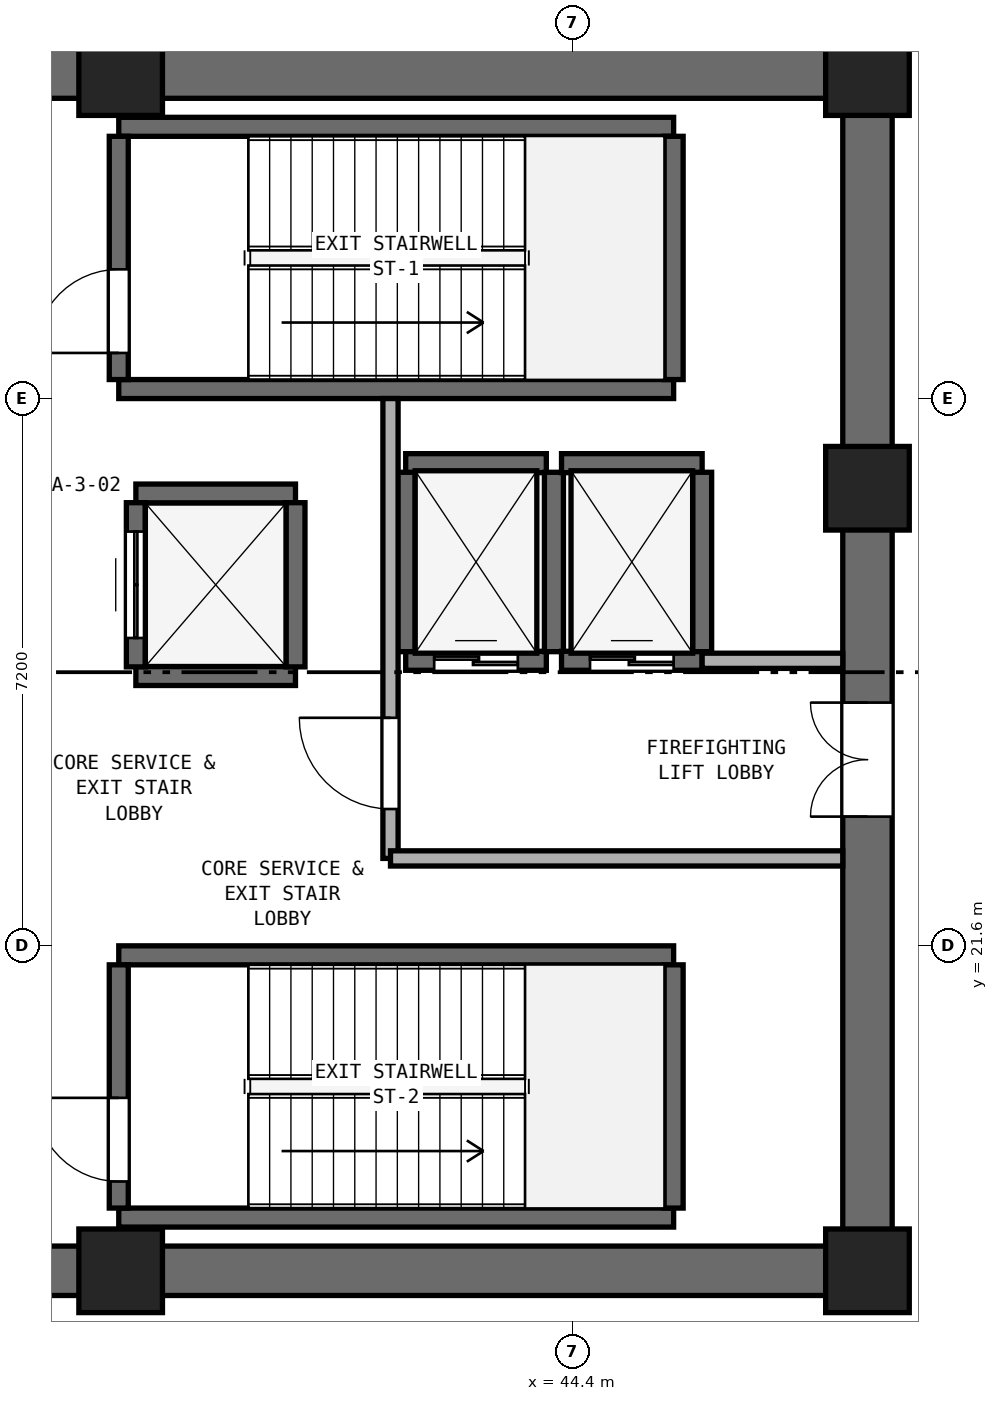
"""IFC4 building model, lengths in metres.
Left out: names, types, materials, properties, quantities, classifications, styles, units other than length and angle.
Written with IfcOpenShell. Run it as: python <this file> out.ifc"""

import sys

from ifc_helpers import new_model, si_unit, direction, frame, frame_2d, origin, origin_2d, place, context, subcontext, project, spatial, rectangle, extrude, element, fill, save


model = new_model("IFC4")
c1 = context("Model", 3, precision=1e-05, world=origin(), true_north=direction((0.0, 1.0)))
c2 = subcontext(c1, "Body", "Model", "MODEL_VIEW")
j1 = project(units=[si_unit("LENGTHUNIT", "METRE"), si_unit("PLANEANGLEUNIT", "RADIAN")], contexts=[c1])
p1 = place(None, origin())
s1 = spatial("IfcSite", under=j1, at=p1, CompositionType="ELEMENT")
p2 = place(p1, origin())
s2 = spatial("IfcBuilding", under=s1, at=p2, CompositionType="ELEMENT")
p3 = place(p2, frame((0.0, 0.0, 5.0)))
s3 = spatial("IfcBuildingStorey", under=s2, at=p3, CompositionType="ELEMENT", Elevation=5.0)
for number, where, z_axis, x_axis in (
    (1, (25.4, 17.325, 0.0), (0.0, 0.0, 1.0), (1.0, 0.0, 0.0)),
    (2, (25.4, 33.075, 0.0), (0.0, 0.0, 1.0), (1.0, 0.0, 0.0)),
):
    element("IfcWall", number, at=place(p3, frame(where, z_axis=z_axis, x_axis=x_axis)), inside=s3, PredefinedType="SHEAR", context=c2, shape_type="SweptSolid", body=[
        extrude(rectangle(XDim=23.2, YDim=0.65, at=frame_2d((11.6, 0.0))), origin(), (0.0, 0.0, 1.0), 4.66),
    ])
p4 = place(p3, frame((48.275, 17.65, 0.0), z_axis=(0.0, 0.0, 1.0), x_axis=(0.0, 1.0, 0.0)))
e3 = element("IfcWall", 3, at=p4, inside=s3, PredefinedType="SHEAR", context=c2, shape_type="SweptSolid", body=[
    extrude(rectangle(XDim=15.1, YDim=0.65, at=frame_2d((7.55, 0.0))), origin(), (0.0, 0.0, 1.0), 4.66),
])
p5 = place(p4, frame((5.65, 0.0, 0.0)))
e4 = element("IfcOpeningElement", 4, at=p5, cuts=e3, PredefinedType="OPENING", context=c2, shape_type="SweptSolid", body=[
    extrude(rectangle(XDim=1.5, YDim=2.15, at=frame_2d((0.75, 1.075))), frame((0.0, 0.335, 0.0), z_axis=(0.0, -1.0, 0.0), x_axis=(1.0, 0.0, 0.0)), (0.0, 0.0, 1.0), 0.67),
])
for number, where, z_axis, x_axis in (
    (5, (38.45, 17.325, 0.0), (0.0, 0.0, 1.0), (1.0, 0.0, 0.0)),
    (6, (48.275, 17.325, 0.0), (0.0, 0.0, 1.0), (1.0, 0.0, 0.0)),
    (7, (48.275, 27.62, 0.0), (0.0, 0.0, 1.0), (1.0, 0.0, 0.0)),
    (8, (48.275, 33.075, 0.0), (0.0, 0.0, 1.0), (1.0, 0.0, 0.0)),
    (9, (38.45, 33.075, 0.0), (0.0, 0.0, 1.0), (1.0, 0.0, 0.0)),
):
    element("IfcColumn", number, at=place(p3, frame(where, z_axis=z_axis, x_axis=x_axis)), inside=s3, PredefinedType="PILASTER", context=c2, shape_type="SweptSolid", body=[
        extrude(rectangle(XDim=1.1, YDim=1.1, at=origin_2d()), origin(), (0.0, 0.0, 1.0), 5.0),
    ])
for number, where, z_axis, x_axis in (
    (10, (38.425, 28.925, 0.0), (0.0, 0.0, 1.0), (1.0, 0.0, 0.0)),
    (11, (38.425, 32.375, 0.0), (0.0, 0.0, 1.0), (1.0, 0.0, 0.0)),
):
    element("IfcWall", number, at=place(p3, frame(where, z_axis=z_axis, x_axis=x_axis)), inside=s3, PredefinedType="SHEAR", context=c2, shape_type="SweptSolid", body=[
        extrude(rectangle(XDim=7.3, YDim=0.25, at=frame_2d((3.65, 0.0))), origin(), (0.0, 0.0, 1.0), 4.66),
    ])
p6 = place(p3, frame((38.425, 29.05, 0.0), z_axis=(0.0, 0.0, 1.0), x_axis=(0.0, 1.0, 0.0)))
e12 = element("IfcWall", 12, at=p6, inside=s3, PredefinedType="SHEAR", context=c2, shape_type="SweptSolid", body=[
    extrude(rectangle(XDim=3.2, YDim=0.25, at=frame_2d((1.6, 0.0))), origin(), (0.0, 0.0, 1.0), 4.66),
])
p7 = place(p6, frame((0.35, 0.0, 0.0)))
e13 = element("IfcOpeningElement", 13, at=p7, cuts=e12, PredefinedType="OPENING", context=c2, shape_type="SweptSolid", body=[
    extrude(rectangle(XDim=1.1, YDim=2.15, at=frame_2d((0.55, 1.075))), frame((0.0, 0.135, 0.0), z_axis=(0.0, -1.0, 0.0), x_axis=(1.0, 0.0, 0.0)), (0.0, 0.0, 1.0), 0.27),
])
p8 = place(p3, frame((45.725, 29.05, 0.0), z_axis=(0.0, 0.0, 1.0), x_axis=(0.0, 1.0, 0.0)))
e14 = element("IfcWall", 14, at=p8, inside=s3, PredefinedType="SHEAR", context=c2, shape_type="SweptSolid", body=[
    extrude(rectangle(XDim=3.2, YDim=0.25, at=frame_2d((1.6, 0.0))), origin(), (0.0, 0.0, 1.0), 4.66),
])
for number, where, z_axis, x_axis in (
    (15, (38.425, 18.025, 0.0), (0.0, 0.0, 1.0), (1.0, 0.0, 0.0)),
    (16, (38.425, 21.475, 0.0), (0.0, 0.0, 1.0), (1.0, 0.0, 0.0)),
):
    element("IfcWall", number, at=place(p3, frame(where, z_axis=z_axis, x_axis=x_axis)), inside=s3, PredefinedType="SHEAR", context=c2, shape_type="SweptSolid", body=[
        extrude(rectangle(XDim=7.3, YDim=0.25, at=frame_2d((3.65, 0.0))), origin(), (0.0, 0.0, 1.0), 4.66),
    ])
p9 = place(p3, frame((38.425, 18.15, 0.0), z_axis=(0.0, 0.0, 1.0), x_axis=(0.0, 1.0, 0.0)))
e17 = element("IfcWall", 17, at=p9, inside=s3, PredefinedType="SHEAR", context=c2, shape_type="SweptSolid", body=[
    extrude(rectangle(XDim=3.2, YDim=0.25, at=frame_2d((1.6, 0.0))), origin(), (0.0, 0.0, 1.0), 4.66),
])
p10 = place(p9, frame((0.35, 0.0, 0.0)))
e18 = element("IfcOpeningElement", 18, at=p10, cuts=e17, PredefinedType="OPENING", context=c2, shape_type="SweptSolid", body=[
    extrude(rectangle(XDim=1.1, YDim=2.15, at=frame_2d((0.55, 1.075))), frame((0.0, 0.135, 0.0), z_axis=(0.0, -1.0, 0.0), x_axis=(1.0, 0.0, 0.0)), (0.0, 0.0, 1.0), 0.27),
])
p11 = place(p3, frame((45.725, 18.15, 0.0), z_axis=(0.0, 0.0, 1.0), x_axis=(0.0, 1.0, 0.0)))
e19 = element("IfcWall", 19, at=p11, inside=s3, PredefinedType="SHEAR", context=c2, shape_type="SweptSolid", body=[
    extrude(rectangle(XDim=3.2, YDim=0.25, at=frame_2d((1.6, 0.0))), origin(), (0.0, 0.0, 1.0), 4.66),
])
p12 = place(p3, frame((42.2, 25.35, 0.0), z_axis=(0.0, 0.0, 1.0), x_axis=(1.0, 0.0, 0.0)))
e20 = element("IfcWall", 20, at=p12, inside=s3, PredefinedType="SHEAR", context=c2, shape_type="SweptSolid", body=[
    extrude(rectangle(XDim=1.85, YDim=0.25, at=frame_2d((0.925, 0.0))), origin(), (0.0, 0.0, 1.0), 4.66),
])
p13 = place(p12, frame((0.375, 0.0, 0.0)))
e21 = element("IfcOpeningElement", 21, at=p13, cuts=e20, PredefinedType="OPENING", context=c2, shape_type="SweptSolid", body=[
    extrude(rectangle(XDim=1.1, YDim=2.15, at=frame_2d((0.55, 1.075))), frame((0.0, 0.135, 0.0), z_axis=(0.0, -1.0, 0.0), x_axis=(1.0, 0.0, 0.0)), (0.0, 0.0, 1.0), 0.27),
])
p14 = place(p3, frame((42.2, 27.95, 0.0), z_axis=(0.0, 0.0, 1.0), x_axis=(1.0, 0.0, 0.0)))
e22 = element("IfcWall", 22, at=p14, inside=s3, PredefinedType="SHEAR", context=c2, shape_type="SweptSolid", body=[
    extrude(rectangle(XDim=1.85, YDim=0.25, at=frame_2d((0.925, 0.0))), origin(), (0.0, 0.0, 1.0), 4.66),
])
for number, where, z_axis, x_axis in (
    (23, (42.2, 25.47, 0.0), (0.0, 0.0, 1.0), (0.0, 1.0, 0.0)),
    (24, (44.15, 25.47, 0.0), (0.0, 0.0, 1.0), (0.0, 1.0, 0.0)),
):
    element("IfcWall", number, at=place(p3, frame(where, z_axis=z_axis, x_axis=x_axis)), inside=s3, PredefinedType="SHEAR", context=c2, shape_type="SweptSolid", body=[
        extrude(rectangle(XDim=2.36, YDim=0.25, at=frame_2d((1.18, 0.0))), origin(), (0.0, 0.0, 1.0), 4.66),
    ])
p15 = place(p3, frame((44.25, 25.35, 0.0), z_axis=(0.0, 0.0, 1.0), x_axis=(1.0, 0.0, 0.0)))
e25 = element("IfcWall", 25, at=p15, inside=s3, PredefinedType="SHEAR", context=c2, shape_type="SweptSolid", body=[
    extrude(rectangle(XDim=1.85, YDim=0.25, at=frame_2d((0.925, 0.0))), origin(), (0.0, 0.0, 1.0), 4.66),
])
p16 = place(p15, frame((0.375, 0.0, 0.0)))
e26 = element("IfcOpeningElement", 26, at=p16, cuts=e25, PredefinedType="OPENING", context=c2, shape_type="SweptSolid", body=[
    extrude(rectangle(XDim=1.1, YDim=2.15, at=frame_2d((0.55, 1.075))), frame((0.0, 0.135, 0.0), z_axis=(0.0, -1.0, 0.0), x_axis=(1.0, 0.0, 0.0)), (0.0, 0.0, 1.0), 0.27),
])
p17 = place(p3, frame((44.25, 27.95, 0.0), z_axis=(0.0, 0.0, 1.0), x_axis=(1.0, 0.0, 0.0)))
e27 = element("IfcWall", 27, at=p17, inside=s3, PredefinedType="SHEAR", context=c2, shape_type="SweptSolid", body=[
    extrude(rectangle(XDim=1.85, YDim=0.25, at=frame_2d((0.925, 0.0))), origin(), (0.0, 0.0, 1.0), 4.66),
])
p18 = place(p3, frame((46.1, 25.47, 0.0), z_axis=(0.0, 0.0, 1.0), x_axis=(0.0, 1.0, 0.0)))
e28 = element("IfcWall", 28, at=p18, inside=s3, PredefinedType="SHEAR", context=c2, shape_type="SweptSolid", body=[
    extrude(rectangle(XDim=2.36, YDim=0.25, at=frame_2d((1.18, 0.0))), origin(), (0.0, 0.0, 1.0), 4.66),
])
for number, where, z_axis, x_axis in (
    (29, (38.65, 25.15, 0.0), (0.0, 0.0, 1.0), (1.0, 0.0, 0.0)),
    (30, (38.65, 27.55, 0.0), (0.0, 0.0, 1.0), (1.0, 0.0, 0.0)),
):
    element("IfcWall", number, at=place(p3, frame(where, z_axis=z_axis, x_axis=x_axis)), inside=s3, PredefinedType="SHEAR", context=c2, shape_type="SweptSolid", body=[
        extrude(rectangle(XDim=2.1, YDim=0.25, at=frame_2d((1.05, 0.0))), origin(), (0.0, 0.0, 1.0), 4.66),
    ])
p19 = place(p3, frame((38.65, 25.27, 0.0), z_axis=(0.0, 0.0, 1.0), x_axis=(0.0, 1.0, 0.0)))
e31 = element("IfcWall", 31, at=p19, inside=s3, PredefinedType="SHEAR", context=c2, shape_type="SweptSolid", body=[
    extrude(rectangle(XDim=2.16, YDim=0.25, at=frame_2d((1.08, 0.0))), origin(), (0.0, 0.0, 1.0), 4.66),
])
p20 = place(p19, frame((0.38, 0.0, 0.0)))
e32 = element("IfcOpeningElement", 32, at=p20, cuts=e31, PredefinedType="OPENING", context=c2, shape_type="SweptSolid", body=[
    extrude(rectangle(XDim=1.4, YDim=2.2, at=frame_2d((0.7, 1.1))), frame((0.0, 0.135, 0.0), z_axis=(0.0, -1.0, 0.0), x_axis=(1.0, 0.0, 0.0)), (0.0, 0.0, 1.0), 0.27),
])
p21 = place(p3, frame((40.75, 25.27, 0.0), z_axis=(0.0, 0.0, 1.0), x_axis=(0.0, 1.0, 0.0)))
e33 = element("IfcWall", 33, at=p21, inside=s3, PredefinedType="SHEAR", context=c2, shape_type="SweptSolid", body=[
    extrude(rectangle(XDim=2.16, YDim=0.25, at=frame_2d((1.08, 0.0))), origin(), (0.0, 0.0, 1.0), 4.66),
])
p22 = place(p3, frame((42.0, 22.75, 0.0), z_axis=(0.0, 0.0, 1.0), x_axis=(0.0, 1.0, 0.0)))
e34 = element("IfcWall", 34, at=p22, inside=s3, PredefinedType="SOLIDWALL", context=c2, shape_type="SweptSolid", body=[
    extrude(rectangle(XDim=6.05, YDim=0.2, at=frame_2d((3.025, 0.0))), origin(), (0.0, 0.0, 1.0), 4.66),
])
p23 = place(p22, frame((0.65, 0.0, 0.0)))
e35 = element("IfcOpeningElement", 35, at=p23, cuts=e34, PredefinedType="OPENING", context=c2, shape_type="SweptSolid", body=[
    extrude(rectangle(XDim=1.2, YDim=2.15, at=frame_2d((0.6, 1.075))), frame((0.0, 0.11, 0.0), z_axis=(0.0, -1.0, 0.0), x_axis=(1.0, 0.0, 0.0)), (0.0, 0.0, 1.0), 0.22),
])
p24 = place(p3, frame((42.0, 22.75, 0.0), z_axis=(0.0, 0.0, 1.0), x_axis=(1.0, 0.0, 0.0)))
e36 = element("IfcWall", 36, at=p24, inside=s3, PredefinedType="SOLIDWALL", context=c2, shape_type="SweptSolid", body=[
    extrude(rectangle(XDim=5.95, YDim=0.2, at=frame_2d((2.975, 0.0))), origin(), (0.0, 0.0, 1.0), 4.66),
])
p25 = place(p3, frame((46.1, 25.35, 0.0), z_axis=(0.0, 0.0, 1.0), x_axis=(1.0, 0.0, 0.0)))
e37 = element("IfcWall", 37, at=p25, inside=s3, PredefinedType="SOLIDWALL", context=c2, shape_type="SweptSolid", body=[
    extrude(rectangle(XDim=1.85, YDim=0.2, at=frame_2d((0.925, 0.0))), origin(), (0.0, 0.0, 1.0), 4.66),
])
p26 = place(p7, origin())
e38 = element("IfcDoor", 38, at=p26, inside=s3, OperationType="SINGLE_SWING_LEFT", PredefinedType="DOOR", context=c2, shape_type="SweptSolid", body=[
    extrude(rectangle(XDim=1.1, YDim=2.15, at=frame_2d((0.55, 1.075))), frame((0.0, 0.025, 0.0), z_axis=(0.0, -1.0, 0.0), x_axis=(1.0, 0.0, 0.0)), (0.0, 0.0, 1.0), 0.05),
])
fill(e13, e38)
p27 = place(p10, origin())
e39 = element("IfcDoor", 39, at=p27, inside=s3, OperationType="SINGLE_SWING_RIGHT", PredefinedType="DOOR", context=c2, shape_type="SweptSolid", body=[
    extrude(rectangle(XDim=1.1, YDim=2.15, at=frame_2d((0.55, 1.075))), frame((0.0, 0.025, 0.0), z_axis=(0.0, -1.0, 0.0), x_axis=(1.0, 0.0, 0.0)), (0.0, 0.0, 1.0), 0.05),
])
fill(e18, e39)
p28 = place(p13, origin())
e40 = element("IfcDoor", 40, at=p28, inside=s3, OperationType="DOUBLE_DOOR_SLIDING", PredefinedType="DOOR", context=c2, shape_type="SweptSolid", body=[
    extrude(rectangle(XDim=1.1, YDim=2.15, at=frame_2d((0.55, 1.075))), frame((0.0, 0.025, 0.0), z_axis=(0.0, -1.0, 0.0), x_axis=(1.0, 0.0, 0.0)), (0.0, 0.0, 1.0), 0.05),
])
fill(e21, e40)
p29 = place(p16, origin())
e41 = element("IfcDoor", 41, at=p29, inside=s3, OperationType="DOUBLE_DOOR_SLIDING", PredefinedType="DOOR", context=c2, shape_type="SweptSolid", body=[
    extrude(rectangle(XDim=1.1, YDim=2.15, at=frame_2d((0.55, 1.075))), frame((0.0, 0.025, 0.0), z_axis=(0.0, -1.0, 0.0), x_axis=(1.0, 0.0, 0.0)), (0.0, 0.0, 1.0), 0.05),
])
fill(e26, e41)
p30 = place(p20, origin())
e42 = element("IfcDoor", 42, at=p30, inside=s3, OperationType="DOUBLE_DOOR_SLIDING", PredefinedType="DOOR", context=c2, shape_type="SweptSolid", body=[
    extrude(rectangle(XDim=1.4, YDim=2.2, at=frame_2d((0.7, 1.1))), frame((0.0, 0.025, 0.0), z_axis=(0.0, -1.0, 0.0), x_axis=(1.0, 0.0, 0.0)), (0.0, 0.0, 1.0), 0.05),
])
fill(e32, e42)
p31 = place(p23, origin())
e43 = element("IfcDoor", 43, at=p31, inside=s3, OperationType="SINGLE_SWING_RIGHT", PredefinedType="DOOR", context=c2, shape_type="SweptSolid", body=[
    extrude(rectangle(XDim=1.2, YDim=2.15, at=frame_2d((0.6, 1.075))), frame((0.0, 0.025, 0.0), z_axis=(0.0, -1.0, 0.0), x_axis=(1.0, 0.0, 0.0)), (0.0, 0.0, 1.0), 0.05),
])
fill(e35, e43)
p32 = place(p5, origin())
e44 = element("IfcDoor", 44, at=p32, inside=s3, OperationType="DOUBLE_DOOR_SINGLE_SWING", PredefinedType="DOOR", context=c2, shape_type="SweptSolid", body=[
    extrude(rectangle(XDim=1.5, YDim=2.15, at=frame_2d((0.75, 1.075))), frame((0.0, 0.025, 0.0), z_axis=(0.0, -1.0, 0.0), x_axis=(1.0, 0.0, 0.0)), (0.0, 0.0, 1.0), 0.05),
])
fill(e4, e44)
save(model, sys.argv[1])
